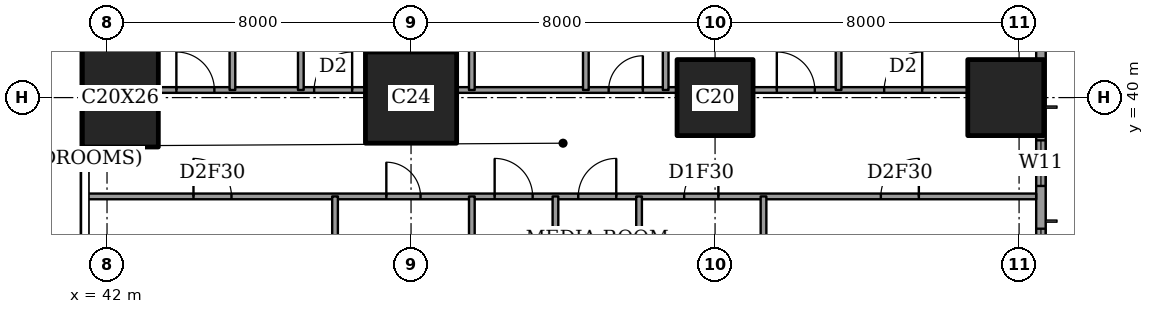
"""IFC4 building model, lengths in metres.
Left out: names, types, materials, properties, quantities, classifications, styles, units other than length and angle.
Written with IfcOpenShell. Run it as: python <this file> out.ifc"""

import sys

from ifc_helpers import new_model, si_unit, direction, frame, frame_2d, origin, origin_2d, place, context, subcontext, project, spatial, rectangle, extrude, element, fill, save


model = new_model("IFC4")
c1 = context("Model", 3, precision=1e-05, world=origin(), true_north=direction((0.0, 1.0)))
c2 = subcontext(c1, "Body", "Model", "MODEL_VIEW")
j1 = project(units=[si_unit("LENGTHUNIT", "METRE"), si_unit("PLANEANGLEUNIT", "RADIAN")], contexts=[c1])
p1 = place(None, origin())
s1 = spatial("IfcSite", under=j1, at=p1, CompositionType="ELEMENT")
p2 = place(p1, origin())
s2 = spatial("IfcBuilding", under=s1, at=p2, CompositionType="ELEMENT")
p3 = place(p2, frame((0.0, 0.0, 157.4)))
s3 = spatial("IfcBuildingStorey", under=s2, at=p3, CompositionType="ELEMENT", Elevation=157.4)
p4 = place(p3, frame((42.35, 40.0, 0.0), z_axis=(0.0, 0.0, 1.0), x_axis=(1.0, 0.0, 0.0)))
e1 = element("IfcColumn", 1, at=p4, inside=s3, PredefinedType="COLUMN", context=c2, shape_type="SweptSolid", body=[
    extrude(rectangle(XDim=2.0, YDim=2.6, at=origin_2d()), origin(), (0.0, 0.0, 1.0), 3.6),
])
p5 = place(p3, frame((50.0, 40.0, 0.0), z_axis=(0.0, 0.0, 1.0), x_axis=(1.0, 0.0, 0.0)))
e2 = element("IfcColumn", 2, at=p5, inside=s3, PredefinedType="COLUMN", context=c2, shape_type="SweptSolid", body=[
    extrude(rectangle(XDim=2.4, YDim=2.4, at=origin_2d()), origin(), (0.0, 0.0, 1.0), 3.6),
])
for number, where, z_axis, x_axis in (
    (3, (58.0, 40.0, 0.0), (0.0, 0.0, 1.0), (1.0, 0.0, 0.0)),
    (4, (65.65, 40.0, 0.0), (0.0, 0.0, 1.0), (1.0, 0.0, 0.0)),
):
    element("IfcColumn", number, at=place(p3, frame(where, z_axis=z_axis, x_axis=x_axis)), inside=s3, PredefinedType="COLUMN", context=c2, shape_type="SweptSolid", body=[
        extrude(rectangle(XDim=2.0, YDim=2.0, at=origin_2d()), origin(), (0.0, 0.0, 1.0), 3.6),
    ])
p6 = place(p3, frame((66.575, 3.175, 0.0), z_axis=(0.0, 0.0, 1.0), x_axis=(0.0, 1.0, 0.0)))
e5 = element("IfcWall", 5, at=p6, inside=s3, PredefinedType="SOLIDWALL", context=c2, shape_type="SweptSolid", body=[
    extrude(rectangle(XDim=41.65, YDim=0.25, at=frame_2d((20.825, 0.0))), origin(), (0.0, 0.0, 1.0), 3.6),
])
p7 = place(p6, frame((0.775, 0.0, 0.4)))
e6 = element("IfcOpeningElement", 6, at=p7, cuts=e5, PredefinedType="OPENING", context=c2, shape_type="SweptSolid", body=[
    extrude(rectangle(XDim=2.4, YDim=2.2, at=frame_2d((1.2, 1.1))), frame((0.0, 0.135, 0.0), z_axis=(0.0, -1.0, 0.0), x_axis=(1.0, 0.0, 0.0)), (0.0, 0.0, 1.0), 0.27),
])
p8 = place(p6, frame((6.225, 0.0, 0.4)))
e7 = element("IfcOpeningElement", 7, at=p8, cuts=e5, PredefinedType="OPENING", context=c2, shape_type="SweptSolid", body=[
    extrude(rectangle(XDim=1.2, YDim=2.2, at=frame_2d((0.6, 1.1))), frame((0.0, 0.135, 0.0), z_axis=(0.0, -1.0, 0.0), x_axis=(1.0, 0.0, 0.0)), (0.0, 0.0, 1.0), 0.27),
])
p9 = place(p6, frame((8.475, 0.0, 0.4)))
e8 = element("IfcOpeningElement", 8, at=p9, cuts=e5, PredefinedType="OPENING", context=c2, shape_type="SweptSolid", body=[
    extrude(rectangle(XDim=2.4, YDim=2.2, at=frame_2d((1.2, 1.1))), frame((0.0, 0.135, 0.0), z_axis=(0.0, -1.0, 0.0), x_axis=(1.0, 0.0, 0.0)), (0.0, 0.0, 1.0), 0.27),
])
p10 = place(p6, frame((15.775, 0.0, 0.4)))
e9 = element("IfcOpeningElement", 9, at=p10, cuts=e5, PredefinedType="OPENING", context=c2, shape_type="SweptSolid", body=[
    extrude(rectangle(XDim=2.4, YDim=2.2, at=frame_2d((1.2, 1.1))), frame((0.0, 0.135, 0.0), z_axis=(0.0, -1.0, 0.0), x_axis=(1.0, 0.0, 0.0)), (0.0, 0.0, 1.0), 0.27),
])
p11 = place(p6, frame((23.475, 0.0, 0.4)))
e10 = element("IfcOpeningElement", 10, at=p11, cuts=e5, PredefinedType="OPENING", context=c2, shape_type="SweptSolid", body=[
    extrude(rectangle(XDim=2.4, YDim=2.2, at=frame_2d((1.2, 1.1))), frame((0.0, 0.135, 0.0), z_axis=(0.0, -1.0, 0.0), x_axis=(1.0, 0.0, 0.0)), (0.0, 0.0, 1.0), 0.27),
])
p12 = place(p6, frame((30.975, 0.0, 0.4)))
e11 = element("IfcOpeningElement", 11, at=p12, cuts=e5, PredefinedType="OPENING", context=c2, shape_type="SweptSolid", body=[
    extrude(rectangle(XDim=2.4, YDim=2.2, at=frame_2d((1.2, 1.1))), frame((0.0, 0.135, 0.0), z_axis=(0.0, -1.0, 0.0), x_axis=(1.0, 0.0, 0.0)), (0.0, 0.0, 1.0), 0.27),
])
p13 = place(p6, frame((34.5, 0.0, 0.4)))
e12 = element("IfcOpeningElement", 12, at=p13, cuts=e5, PredefinedType="OPENING", context=c2, shape_type="SweptSolid", body=[
    extrude(rectangle(XDim=1.2, YDim=2.2, at=frame_2d((0.6, 1.1))), frame((0.0, 0.135, 0.0), z_axis=(0.0, -1.0, 0.0), x_axis=(1.0, 0.0, 0.0)), (0.0, 0.0, 1.0), 0.27),
])
p14 = place(p6, frame((38.475, 0.0, 0.4)))
e13 = element("IfcOpeningElement", 13, at=p14, cuts=e5, PredefinedType="OPENING", context=c2, shape_type="SweptSolid", body=[
    extrude(rectangle(XDim=2.4, YDim=2.2, at=frame_2d((1.2, 1.1))), frame((0.0, 0.135, 0.0), z_axis=(0.0, -1.0, 0.0), x_axis=(1.0, 0.0, 0.0)), (0.0, 0.0, 1.0), 0.27),
])
p15 = place(p3, frame((41.439, 37.4, 0.0), z_axis=(0.0, 0.0, 1.0), x_axis=(1.0, 0.0, 0.0)))
e14 = element("IfcWall", 14, at=p15, inside=s3, PredefinedType="PARTITIONING", context=c2, shape_type="SweptSolid", body=[
    extrude(rectangle(XDim=25.011, YDim=0.15, at=frame_2d((12.505, 0.0))), origin(), (0.0, 0.0, 1.0), 3.35),
])
p16 = place(p15, frame((10.761, 0.0, 0.0)))
e15 = element("IfcOpeningElement", 15, at=p16, cuts=e14, PredefinedType="OPENING", context=c2, shape_type="SweptSolid", body=[
    extrude(rectangle(XDim=1.0, YDim=2.1, at=frame_2d((0.5, 1.05))), frame((0.0, 0.085, 0.0), z_axis=(0.0, -1.0, 0.0), x_axis=(1.0, 0.0, 0.0)), (0.0, 0.0, 1.0), 0.17),
])
p17 = place(p15, frame((20.924, 0.0, 0.0)))
e16 = element("IfcOpeningElement", 16, at=p17, cuts=e14, PredefinedType="OPENING", context=c2, shape_type="SweptSolid", body=[
    extrude(rectangle(XDim=1.0, YDim=2.1, at=frame_2d((0.5, 1.05))), frame((0.0, 0.085, 0.0), z_axis=(0.0, -1.0, 0.0), x_axis=(1.0, 0.0, 0.0)), (0.0, 0.0, 1.0), 0.17),
])
p18 = place(p15, frame((15.749, 0.0, 0.0)))
e17 = element("IfcOpeningElement", 17, at=p18, cuts=e14, PredefinedType="OPENING", context=c2, shape_type="SweptSolid", body=[
    extrude(rectangle(XDim=0.9, YDim=2.1, at=frame_2d((0.45, 1.05))), frame((0.0, 0.085, 0.0), z_axis=(0.0, -1.0, 0.0), x_axis=(1.0, 0.0, 0.0)), (0.0, 0.0, 1.0), 0.17),
])
p19 = place(p15, frame((12.961, 0.0, 0.0)))
e18 = element("IfcOpeningElement", 18, at=p19, cuts=e14, PredefinedType="OPENING", context=c2, shape_type="SweptSolid", body=[
    extrude(rectangle(XDim=1.0, YDim=2.1, at=frame_2d((0.5, 1.05))), frame((0.0, 0.085, 0.0), z_axis=(0.0, -1.0, 0.0), x_axis=(1.0, 0.0, 0.0)), (0.0, 0.0, 1.0), 0.17),
])
p20 = place(p15, frame((7.911, 0.0, 0.0)))
e19 = element("IfcOpeningElement", 19, at=p20, cuts=e14, PredefinedType="OPENING", context=c2, shape_type="SweptSolid", body=[
    extrude(rectangle(XDim=0.9, YDim=2.1, at=frame_2d((0.45, 1.05))), frame((0.0, 0.085, 0.0), z_axis=(0.0, -1.0, 0.0), x_axis=(1.0, 0.0, 0.0)), (0.0, 0.0, 1.0), 0.17),
])
p21 = place(p15, frame((2.836, 0.0, 0.0)))
e20 = element("IfcOpeningElement", 20, at=p21, cuts=e14, PredefinedType="OPENING", context=c2, shape_type="SweptSolid", body=[
    extrude(rectangle(XDim=1.0, YDim=2.1, at=frame_2d((0.5, 1.05))), frame((0.0, 0.085, 0.0), z_axis=(0.0, -1.0, 0.0), x_axis=(1.0, 0.0, 0.0)), (0.0, 0.0, 1.0), 0.17),
])
p22 = place(p3, frame((43.35, 40.2, 0.0), z_axis=(0.0, 0.0, 1.0), x_axis=(1.0, 0.0, 0.0)))
e21 = element("IfcWall", 21, at=p22, inside=s3, PredefinedType="PARTITIONING", context=c2, shape_type="SweptSolid", body=[
    extrude(rectangle(XDim=5.45, YDim=0.15, at=frame_2d((2.725, 0.0))), origin(), (0.0, 0.0, 1.0), 3.35),
])
p23 = place(p22, frame((4.1, 0.0, 0.0)))
e22 = element("IfcOpeningElement", 22, at=p23, cuts=e21, PredefinedType="OPENING", context=c2, shape_type="SweptSolid", body=[
    extrude(rectangle(XDim=1.0, YDim=2.1, at=frame_2d((0.5, 1.05))), frame((0.0, 0.085, 0.0), z_axis=(0.0, -1.0, 0.0), x_axis=(1.0, 0.0, 0.0)), (0.0, 0.0, 1.0), 0.17),
])
p24 = place(p22, frame((0.475, 0.0, 0.0)))
e23 = element("IfcOpeningElement", 23, at=p24, cuts=e21, PredefinedType="OPENING", context=c2, shape_type="SweptSolid", body=[
    extrude(rectangle(XDim=1.0, YDim=2.1, at=frame_2d((0.5, 1.05))), frame((0.0, 0.085, 0.0), z_axis=(0.0, -1.0, 0.0), x_axis=(1.0, 0.0, 0.0)), (0.0, 0.0, 1.0), 0.17),
])
p25 = place(p3, frame((51.2, 40.2, 0.0), z_axis=(0.0, 0.0, 1.0), x_axis=(1.0, 0.0, 0.0)))
e24 = element("IfcWall", 24, at=p25, inside=s3, PredefinedType="PARTITIONING", context=c2, shape_type="SweptSolid", body=[
    extrude(rectangle(XDim=5.8, YDim=0.15, at=frame_2d((2.9, 0.0))), origin(), (0.0, 0.0, 1.0), 3.35),
])
p26 = place(p25, frame((4.0, 0.0, 0.0)))
e25 = element("IfcOpeningElement", 25, at=p26, cuts=e24, PredefinedType="OPENING", context=c2, shape_type="SweptSolid", body=[
    extrude(rectangle(XDim=0.9, YDim=2.1, at=frame_2d((0.45, 1.05))), frame((0.0, 0.085, 0.0), z_axis=(0.0, -1.0, 0.0), x_axis=(1.0, 0.0, 0.0)), (0.0, 0.0, 1.0), 0.17),
])
p27 = place(p3, frame((59.0, 40.2, 0.0), z_axis=(0.0, 0.0, 1.0), x_axis=(1.0, 0.0, 0.0)))
e26 = element("IfcWall", 26, at=p27, inside=s3, PredefinedType="PARTITIONING", context=c2, shape_type="SweptSolid", body=[
    extrude(rectangle(XDim=5.65, YDim=0.15, at=frame_2d((2.825, 0.0))), origin(), (0.0, 0.0, 1.0), 3.35),
])
p28 = place(p27, frame((3.45, 0.0, 0.0)))
e27 = element("IfcOpeningElement", 27, at=p28, cuts=e26, PredefinedType="OPENING", context=c2, shape_type="SweptSolid", body=[
    extrude(rectangle(XDim=1.0, YDim=2.1, at=frame_2d((0.5, 1.05))), frame((0.0, 0.085, 0.0), z_axis=(0.0, -1.0, 0.0), x_axis=(1.0, 0.0, 0.0)), (0.0, 0.0, 1.0), 0.17),
])
p29 = place(p27, frame((0.625, 0.0, 0.0)))
e28 = element("IfcOpeningElement", 28, at=p29, cuts=e26, PredefinedType="OPENING", context=c2, shape_type="SweptSolid", body=[
    extrude(rectangle(XDim=1.0, YDim=2.1, at=frame_2d((0.5, 1.05))), frame((0.0, 0.085, 0.0), z_axis=(0.0, -1.0, 0.0), x_axis=(1.0, 0.0, 0.0)), (0.0, 0.0, 1.0), 0.17),
])
p30 = place(p3, frame((45.3, 40.2, 0.0), z_axis=(0.0, 0.0, 1.0), x_axis=(0.0, 1.0, 0.0)))
e29 = element("IfcWall", 29, at=p30, inside=s3, PredefinedType="PARTITIONING", context=c2, shape_type="SweptSolid", body=[
    extrude(rectangle(XDim=8.25, YDim=0.15, at=frame_2d((4.125, 0.0))), origin(), (0.0, 0.0, 1.0), 3.35),
])
p31 = place(p30, frame((3.675, 0.0, 0.0)))
e30 = element("IfcOpeningElement", 30, at=p31, cuts=e29, PredefinedType="OPENING", context=c2, shape_type="SweptSolid", body=[
    extrude(rectangle(XDim=0.9, YDim=2.1, at=frame_2d((0.45, 1.05))), frame((0.0, 0.085, 0.0), z_axis=(0.0, -1.0, 0.0), x_axis=(1.0, 0.0, 0.0)), (0.0, 0.0, 1.0), 0.17),
])
p32 = place(p3, frame((47.1, 40.2, 0.0), z_axis=(0.0, 0.0, 1.0), x_axis=(0.0, 1.0, 0.0)))
e31 = element("IfcWall", 31, at=p32, inside=s3, PredefinedType="PARTITIONING", context=c2, shape_type="SweptSolid", body=[
    extrude(rectangle(XDim=8.25, YDim=0.15, at=frame_2d((4.125, 0.0))), origin(), (0.0, 0.0, 1.0), 3.35),
])
p33 = place(p3, frame((48.0, 28.0, 0.0), z_axis=(0.0, 0.0, 1.0), x_axis=(0.0, 1.0, 0.0)))
e32 = element("IfcWall", 32, at=p33, inside=s3, PredefinedType="PARTITIONING", context=c2, shape_type="SweptSolid", body=[
    extrude(rectangle(XDim=9.4, YDim=0.15, at=frame_2d((4.7, 0.0))), origin(), (0.0, 0.0, 1.0), 3.35),
])
p34 = place(p33, frame((0.5, 0.0, 0.0)))
e33 = element("IfcOpeningElement", 33, at=p34, cuts=e32, PredefinedType="OPENING", context=c2, shape_type="SweptSolid", body=[
    extrude(rectangle(XDim=1.0, YDim=2.1, at=frame_2d((0.5, 1.05))), frame((0.0, 0.085, 0.0), z_axis=(0.0, -1.0, 0.0), x_axis=(1.0, 0.0, 0.0)), (0.0, 0.0, 1.0), 0.17),
])
p35 = place(p3, frame((51.6, 30.0, 0.0), z_axis=(0.0, 0.0, 1.0), x_axis=(0.0, 1.0, 0.0)))
e34 = element("IfcWall", 34, at=p35, inside=s3, PredefinedType="PARTITIONING", context=c2, shape_type="SweptSolid", body=[
    extrude(rectangle(XDim=7.4, YDim=0.15, at=frame_2d((3.7, 0.0))), origin(), (0.0, 0.0, 1.0), 3.35),
])
p36 = place(p3, frame((51.6, 40.2, 0.0), z_axis=(0.0, 0.0, 1.0), x_axis=(0.0, 1.0, 0.0)))
e35 = element("IfcWall", 35, at=p36, inside=s3, PredefinedType="PARTITIONING", context=c2, shape_type="SweptSolid", body=[
    extrude(rectangle(XDim=8.25, YDim=0.15, at=frame_2d((4.125, 0.0))), origin(), (0.0, 0.0, 1.0), 3.35),
])
p37 = place(p36, frame((3.675, 0.0, 0.0)))
e36 = element("IfcOpeningElement", 36, at=p37, cuts=e35, PredefinedType="OPENING", context=c2, shape_type="SweptSolid", body=[
    extrude(rectangle(XDim=0.9, YDim=2.1, at=frame_2d((0.45, 1.05))), frame((0.0, 0.085, 0.0), z_axis=(0.0, -1.0, 0.0), x_axis=(1.0, 0.0, 0.0)), (0.0, 0.0, 1.0), 0.17),
])
p38 = place(p3, frame((53.8, 30.0, 0.0), z_axis=(0.0, 0.0, 1.0), x_axis=(0.0, 1.0, 0.0)))
e37 = element("IfcWall", 37, at=p38, inside=s3, PredefinedType="PARTITIONING", context=c2, shape_type="SweptSolid", body=[
    extrude(rectangle(XDim=7.4, YDim=0.15, at=frame_2d((3.7, 0.0))), origin(), (0.0, 0.0, 1.0), 3.35),
])
p39 = place(p3, frame((54.6, 40.2, 0.0), z_axis=(0.0, 0.0, 1.0), x_axis=(0.0, 1.0, 0.0)))
e38 = element("IfcWall", 38, at=p39, inside=s3, PredefinedType="PARTITIONING", context=c2, shape_type="SweptSolid", body=[
    extrude(rectangle(XDim=8.25, YDim=0.15, at=frame_2d((4.125, 0.0))), origin(), (0.0, 0.0, 1.0), 3.35),
])
p40 = place(p3, frame((56.0, 28.0, 0.0), z_axis=(0.0, 0.0, 1.0), x_axis=(0.0, 1.0, 0.0)))
e39 = element("IfcWall", 39, at=p40, inside=s3, PredefinedType="PARTITIONING", context=c2, shape_type="SweptSolid", body=[
    extrude(rectangle(XDim=9.4, YDim=0.15, at=frame_2d((4.7, 0.0))), origin(), (0.0, 0.0, 1.0), 3.35),
])
p41 = place(p40, frame((0.5, 0.0, 0.0)))
e40 = element("IfcOpeningElement", 40, at=p41, cuts=e39, PredefinedType="OPENING", context=c2, shape_type="SweptSolid", body=[
    extrude(rectangle(XDim=1.0, YDim=2.1, at=frame_2d((0.5, 1.05))), frame((0.0, 0.085, 0.0), z_axis=(0.0, -1.0, 0.0), x_axis=(1.0, 0.0, 0.0)), (0.0, 0.0, 1.0), 0.17),
])
p42 = place(p3, frame((56.7, 40.2, 0.0), z_axis=(0.0, 0.0, 1.0), x_axis=(0.0, 1.0, 0.0)))
e41 = element("IfcWall", 41, at=p42, inside=s3, PredefinedType="PARTITIONING", context=c2, shape_type="SweptSolid", body=[
    extrude(rectangle(XDim=8.25, YDim=0.15, at=frame_2d((4.125, 0.0))), origin(), (0.0, 0.0, 1.0), 3.35),
])
p43 = place(p3, frame((59.275, 33.2, 0.0), z_axis=(0.0, 0.0, 1.0), x_axis=(0.0, 1.0, 0.0)))
e42 = element("IfcWall", 42, at=p43, inside=s3, PredefinedType="PARTITIONING", context=c2, shape_type="SweptSolid", body=[
    extrude(rectangle(XDim=4.2, YDim=0.15, at=frame_2d((2.1, 0.0))), origin(), (0.0, 0.0, 1.0), 3.35),
])
p44 = place(p3, frame((61.25, 40.2, 0.0), z_axis=(0.0, 0.0, 1.0), x_axis=(0.0, 1.0, 0.0)))
e43 = element("IfcWall", 43, at=p44, inside=s3, PredefinedType="PARTITIONING", context=c2, shape_type="SweptSolid", body=[
    extrude(rectangle(XDim=8.25, YDim=0.15, at=frame_2d((4.125, 0.0))), origin(), (0.0, 0.0, 1.0), 3.35),
])
p45 = place(p12, origin())
e44 = element("IfcWindow", 44, at=p45, inside=s3, PartitioningType="SINGLE_PANEL", PredefinedType="WINDOW", context=c2, shape_type="SweptSolid", body=[
    extrude(rectangle(XDim=2.4, YDim=2.2, at=frame_2d((1.2, 1.1))), frame((0.0, 0.03, 0.0), z_axis=(0.0, -1.0, 0.0), x_axis=(1.0, 0.0, 0.0)), (0.0, 0.0, 1.0), 0.06),
])
fill(e11, e44)
p46 = place(p13, origin())
e45 = element("IfcWindow", 45, at=p46, inside=s3, PartitioningType="SINGLE_PANEL", PredefinedType="WINDOW", context=c2, shape_type="SweptSolid", body=[
    extrude(rectangle(XDim=1.2, YDim=2.2, at=frame_2d((0.6, 1.1))), frame((0.0, 0.03, 0.0), z_axis=(0.0, -1.0, 0.0), x_axis=(1.0, 0.0, 0.0)), (0.0, 0.0, 1.0), 0.06),
])
fill(e12, e45)
p47 = place(p28, origin())
e46 = element("IfcDoor", 46, at=p47, inside=s3, OperationType="SINGLE_SWING_LEFT", PredefinedType="DOOR", context=c2, shape_type="SweptSolid", body=[
    extrude(rectangle(XDim=1.0, YDim=2.1, at=frame_2d((0.5, 1.05))), frame((0.0, 0.025, 0.0), z_axis=(0.0, -1.0, 0.0), x_axis=(1.0, 0.0, 0.0)), (0.0, 0.0, 1.0), 0.05),
])
fill(e27, e46)
p48 = place(p29, origin())
e47 = element("IfcDoor", 47, at=p48, inside=s3, OperationType="SINGLE_SWING_RIGHT", PredefinedType="DOOR", context=c2, shape_type="SweptSolid", body=[
    extrude(rectangle(XDim=1.0, YDim=2.1, at=frame_2d((0.5, 1.05))), frame((0.0, 0.025, 0.0), z_axis=(0.0, -1.0, 0.0), x_axis=(1.0, 0.0, 0.0)), (0.0, 0.0, 1.0), 0.05),
])
fill(e28, e47)
p49 = place(p26, origin())
e48 = element("IfcDoor", 48, at=p49, inside=s3, OperationType="SINGLE_SWING_LEFT", PredefinedType="DOOR", context=c2, shape_type="SweptSolid", body=[
    extrude(rectangle(XDim=0.9, YDim=2.1, at=frame_2d((0.45, 1.05))), frame((0.0, 0.025, 0.0), z_axis=(0.0, -1.0, 0.0), x_axis=(1.0, 0.0, 0.0)), (0.0, 0.0, 1.0), 0.05),
])
fill(e25, e48)
p50 = place(p23, origin())
e49 = element("IfcDoor", 49, at=p50, inside=s3, OperationType="SINGLE_SWING_LEFT", PredefinedType="DOOR", context=c2, shape_type="SweptSolid", body=[
    extrude(rectangle(XDim=1.0, YDim=2.1, at=frame_2d((0.5, 1.05))), frame((0.0, 0.025, 0.0), z_axis=(0.0, -1.0, 0.0), x_axis=(1.0, 0.0, 0.0)), (0.0, 0.0, 1.0), 0.05),
])
fill(e22, e49)
p51 = place(p24, origin())
e50 = element("IfcDoor", 50, at=p51, inside=s3, OperationType="SINGLE_SWING_RIGHT", PredefinedType="DOOR", context=c2, shape_type="SweptSolid", body=[
    extrude(rectangle(XDim=1.0, YDim=2.1, at=frame_2d((0.5, 1.05))), frame((0.0, 0.025, 0.0), z_axis=(0.0, -1.0, 0.0), x_axis=(1.0, 0.0, 0.0)), (0.0, 0.0, 1.0), 0.05),
])
fill(e23, e50)
p52 = place(p16, origin())
e51 = element("IfcDoor", 51, at=p52, inside=s3, OperationType="SINGLE_SWING_RIGHT", PredefinedType="DOOR", context=c2, shape_type="SweptSolid", body=[
    extrude(rectangle(XDim=1.0, YDim=2.1, at=frame_2d((0.5, 1.05))), frame((0.0, 0.025, 0.0), z_axis=(0.0, -1.0, 0.0), x_axis=(1.0, 0.0, 0.0)), (0.0, 0.0, 1.0), 0.05),
])
fill(e15, e51)
p53 = place(p17, origin())
e52 = element("IfcDoor", 52, at=p53, inside=s3, OperationType="SINGLE_SWING_LEFT", PredefinedType="DOOR", context=c2, shape_type="SweptSolid", body=[
    extrude(rectangle(XDim=1.0, YDim=2.1, at=frame_2d((0.5, 1.05))), frame((0.0, 0.025, 0.0), z_axis=(0.0, -1.0, 0.0), x_axis=(1.0, 0.0, 0.0)), (0.0, 0.0, 1.0), 0.05),
])
fill(e16, e52)
p54 = place(p18, origin())
e53 = element("IfcDoor", 53, at=p54, inside=s3, OperationType="SINGLE_SWING_LEFT", PredefinedType="DOOR", context=c2, shape_type="SweptSolid", body=[
    extrude(rectangle(XDim=0.9, YDim=2.1, at=frame_2d((0.45, 1.05))), frame((0.0, 0.025, 0.0), z_axis=(0.0, -1.0, 0.0), x_axis=(1.0, 0.0, 0.0)), (0.0, 0.0, 1.0), 0.05),
])
fill(e17, e53)
p55 = place(p19, origin())
e54 = element("IfcDoor", 54, at=p55, inside=s3, OperationType="SINGLE_SWING_LEFT", PredefinedType="DOOR", context=c2, shape_type="SweptSolid", body=[
    extrude(rectangle(XDim=1.0, YDim=2.1, at=frame_2d((0.5, 1.05))), frame((0.0, 0.025, 0.0), z_axis=(0.0, -1.0, 0.0), x_axis=(1.0, 0.0, 0.0)), (0.0, 0.0, 1.0), 0.05),
])
fill(e18, e54)
p56 = place(p20, origin())
e55 = element("IfcDoor", 55, at=p56, inside=s3, OperationType="SINGLE_SWING_RIGHT", PredefinedType="DOOR", context=c2, shape_type="SweptSolid", body=[
    extrude(rectangle(XDim=0.9, YDim=2.1, at=frame_2d((0.45, 1.05))), frame((0.0, 0.025, 0.0), z_axis=(0.0, -1.0, 0.0), x_axis=(1.0, 0.0, 0.0)), (0.0, 0.0, 1.0), 0.05),
])
fill(e19, e55)
p57 = place(p21, origin())
e56 = element("IfcDoor", 56, at=p57, inside=s3, OperationType="SINGLE_SWING_RIGHT", PredefinedType="DOOR", context=c2, shape_type="SweptSolid", body=[
    extrude(rectangle(XDim=1.0, YDim=2.1, at=frame_2d((0.5, 1.05))), frame((0.0, 0.025, 0.0), z_axis=(0.0, -1.0, 0.0), x_axis=(1.0, 0.0, 0.0)), (0.0, 0.0, 1.0), 0.05),
])
fill(e20, e56)
save(model, sys.argv[1])
